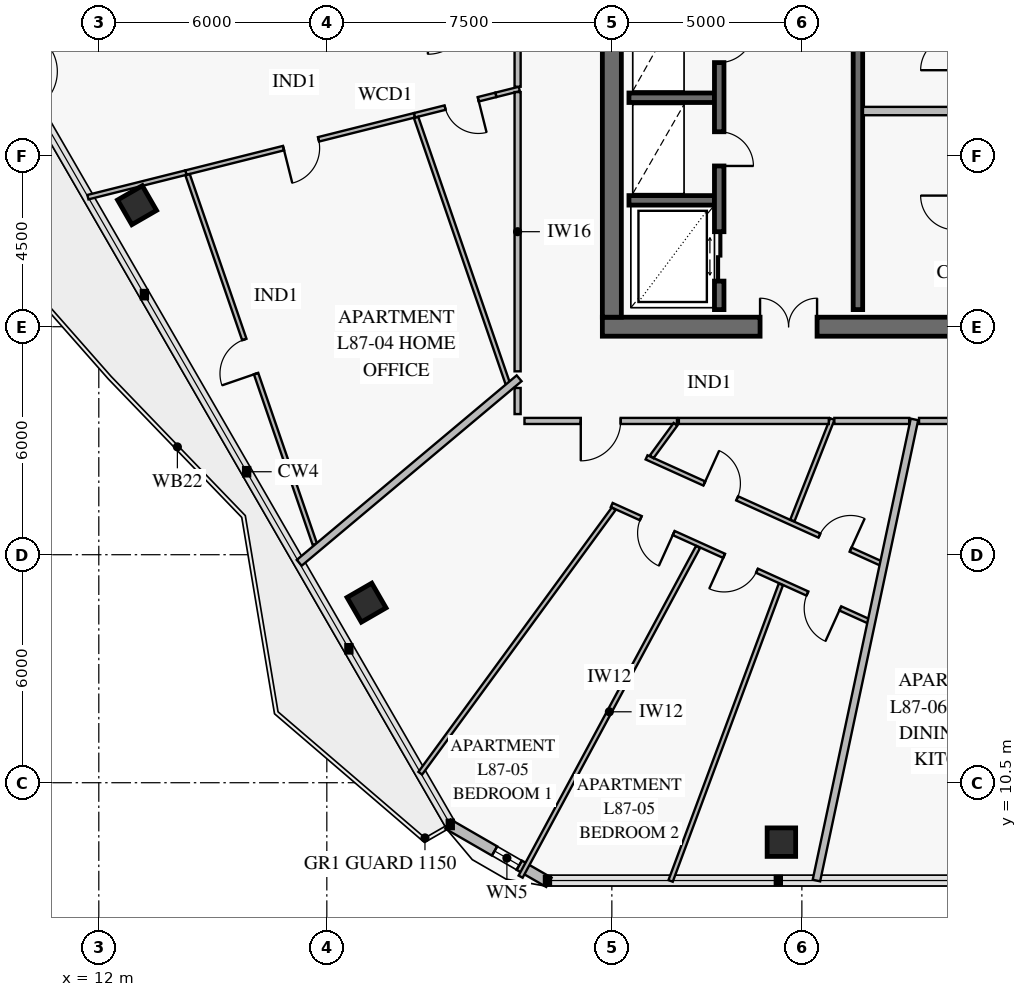
"""IFC4 building model, lengths in metres.
Left out: names, types, materials, properties, quantities, classifications, styles, units other than length and angle.
Written with IfcOpenShell. Run it as: python <this file> out.ifc"""

import sys

from ifc_helpers import new_model, si_unit, direction, frame, frame_2d, origin, origin_2d, place, context, subcontext, project, spatial, rectangle, extrude, element, fill, save


model = new_model("IFC4")
c1 = context("Model", 3, precision=1e-05, world=origin(), true_north=direction((0.0, 1.0)))
c2 = subcontext(c1, "Body", "Model", "MODEL_VIEW")
j1 = project(units=[si_unit("LENGTHUNIT", "METRE"), si_unit("PLANEANGLEUNIT", "RADIAN")], contexts=[c1])
p1 = place(None, origin())
s1 = spatial("IfcSite", under=j1, at=p1, CompositionType="ELEMENT")
p2 = place(p1, origin())
s2 = spatial("IfcBuilding", under=s1, at=p2, CompositionType="ELEMENT")
p3 = place(p2, frame((0.0, 0.0, 342.4)))
s3 = spatial("IfcBuildingStorey", under=s2, at=p3, CompositionType="ELEMENT", Elevation=342.4)
p4 = place(p3, frame((25.25, 22.5, 0.0), z_axis=(0.0, 0.0, 1.0), x_axis=(1.0, 0.0, 0.0)))
e1 = element("IfcWall", 1, at=p4, inside=s3, PredefinedType="SHEAR", context=c2, shape_type="SweptSolid", body=[
    extrude(rectangle(XDim=9.8, YDim=0.5, at=frame_2d((4.9, 0.0))), origin(), (0.0, 0.0, 1.0), 3.8),
])
p5 = place(p4, frame((4.15, 0.0, 0.0)))
e2 = element("IfcOpeningElement", 2, at=p5, cuts=e1, PredefinedType="OPENING", context=c2, shape_type="SweptSolid", body=[
    extrude(rectangle(XDim=1.5, YDim=2.15, at=frame_2d((0.75, 1.075))), frame((0.0, 0.262, 0.0), z_axis=(0.0, -1.0, 0.0), x_axis=(1.0, 0.0, 0.0)), (0.0, 0.0, 1.0), 0.524),
])
p6 = place(p3, frame((25.5, 22.75, 0.0), z_axis=(0.0, 0.0, 1.0), x_axis=(0.0, 1.0, 0.0)))
e3 = element("IfcWall", 3, at=p6, inside=s3, PredefinedType="SHEAR", context=c2, shape_type="SweptSolid", body=[
    extrude(rectangle(XDim=18.5, YDim=0.5, at=frame_2d((9.25, 0.0))), origin(), (0.0, 0.0, 1.0), 3.8),
])
p7 = place(p6, frame((9.0, 0.0, 0.0)))
e4 = element("IfcOpeningElement", 4, at=p7, cuts=e3, PredefinedType="OPENING", context=c2, shape_type="SweptSolid", body=[
    extrude(rectangle(XDim=1.1, YDim=2.15, at=frame_2d((0.55, 1.075))), frame((0.0, 0.262, 0.0), z_axis=(0.0, -1.0, 0.0), x_axis=(1.0, 0.0, 0.0)), (0.0, 0.0, 1.0), 0.524),
])
for number, where, z_axis, x_axis in (
    (5, (13.007, 25.698, 0.0), (0.0, 0.0, 1.0), (0.5, -0.866, 0.0)),
    (6, (19.045, 15.238, 0.0), (0.0, 0.0, 1.0), (0.5, -0.866, 0.0)),
    (7, (29.961, 8.936, 0.0), (0.0, 0.0, 1.0), (1.0, 0.0, 0.0)),
):
    element("IfcColumn", number, at=place(p3, frame(where, z_axis=z_axis, x_axis=x_axis)), inside=s3, PredefinedType="COLUMN", context=c2, shape_type="SweptSolid", body=[
        extrude(rectangle(XDim=0.75, YDim=0.75, at=origin_2d()), origin(), (0.0, 0.0, 1.0), 3.55),
    ])
p8 = place(p3, frame((23.843, 7.878, 0.0), z_axis=(0.0, 0.0, 1.0), x_axis=(-0.866023752521, 0.50000286006, 0.0)))
e8 = element("IfcWall", 8, at=p8, inside=s3, PredefinedType="SOLIDWALL", context=c2, shape_type="SweptSolid", body=[
    extrude(rectangle(XDim=3.065, YDim=0.28, at=frame_2d((1.532, 0.0))), origin(), (0.0, 0.0, 1.0), 3.55),
])
p9 = place(p8, frame((0.901, 0.0, 0.85)))
e9 = element("IfcOpeningElement", 9, at=p9, cuts=e8, PredefinedType="OPENING", context=c2, shape_type="SweptSolid", body=[
    extrude(rectangle(XDim=0.75, YDim=1.5, at=frame_2d((0.375, 0.75))), frame((0.0, 0.152, 0.0), z_axis=(0.0, -1.0, 0.0), x_axis=(1.0, 0.0, 0.0)), (0.0, 0.0, 1.0), 0.304),
])
for number, where, z_axis, x_axis in (
    (10, (25.95, 25.825, 0.0), (0.0, 0.0, 1.0), (1.0, 0.0, 0.0)),
    (11, (25.95, 28.525, 0.0), (0.0, 0.0, 1.0), (1.0, 0.0, 0.0)),
):
    element("IfcWall", number, at=place(p3, frame(where, z_axis=z_axis, x_axis=x_axis)), inside=s3, PredefinedType="SOLIDWALL", context=c2, shape_type="SweptSolid", body=[
        extrude(rectangle(XDim=2.25, YDim=0.25, at=frame_2d((1.125, 0.0))), origin(), (0.0, 0.0, 1.0), 3.8),
    ])
p10 = place(p3, frame((28.325, 22.95, 0.0), z_axis=(0.0, 0.0, 1.0), x_axis=(0.0, 1.0, 0.0)))
e12 = element("IfcWall", 12, at=p10, inside=s3, PredefinedType="SOLIDWALL", context=c2, shape_type="SweptSolid", body=[
    extrude(rectangle(XDim=8.2, YDim=0.25, at=frame_2d((4.1, 0.0))), origin(), (0.0, 0.0, 1.0), 3.8),
])
p11 = place(p10, frame((0.75, 0.0, 0.0)))
e13 = element("IfcOpeningElement", 13, at=p11, cuts=e12, PredefinedType="OPENING", context=c2, shape_type="SweptSolid", body=[
    extrude(rectangle(XDim=1.3, YDim=2.3, at=frame_2d((0.65, 1.15))), frame((0.0, 0.137, 0.0), z_axis=(0.0, -1.0, 0.0), x_axis=(1.0, 0.0, 0.0)), (0.0, 0.0, 1.0), 0.274),
])
p12 = place(p10, frame((3.78, 0.0, 0.0)))
e14 = element("IfcOpeningElement", 14, at=p12, cuts=e12, PredefinedType="OPENING", context=c2, shape_type="SweptSolid", body=[
    extrude(rectangle(XDim=0.9, YDim=2.1, at=frame_2d((0.45, 1.05))), frame((0.0, 0.137, 0.0), z_axis=(0.0, -1.0, 0.0), x_axis=(1.0, 0.0, 0.0)), (0.0, 0.0, 1.0), 0.274),
])
p13 = place(p10, frame((6.5, 0.0, 0.0)))
e15 = element("IfcOpeningElement", 15, at=p13, cuts=e12, PredefinedType="OPENING", context=c2, shape_type="SweptSolid", body=[
    extrude(rectangle(XDim=0.9, YDim=2.1, at=frame_2d((0.45, 1.05))), frame((0.0, 0.137, 0.0), z_axis=(0.0, -1.0, 0.0), x_axis=(1.0, 0.0, 0.0)), (0.0, 0.0, 1.0), 0.274),
])
p14 = place(p3, frame((31.975, 22.95, 0.0), z_axis=(0.0, 0.0, 1.0), x_axis=(0.0, 1.0, 0.0)))
e16 = element("IfcWall", 16, at=p14, inside=s3, PredefinedType="SOLIDWALL", context=c2, shape_type="SweptSolid", body=[
    extrude(rectangle(XDim=8.2, YDim=0.25, at=frame_2d((4.1, 0.0))), origin(), (0.0, 0.0, 1.0), 3.8),
])
p15 = place(p3, frame((22.45, 28.602, 0.0), z_axis=(0.0, 0.0, 1.0), x_axis=(-0.969941016034, -0.243340143452, 0.0)))
e17 = element("IfcWall", 17, at=p15, inside=s3, PredefinedType="PARTITIONING", context=c2, shape_type="SweptSolid", body=[
    extrude(rectangle(XDim=2.213, YDim=0.12, at=frame_2d((1.106, 0.0))), origin(), (0.0, 0.0, 1.0), 3.55),
])
p16 = place(p15, frame((0.479, 0.0, 0.0)))
e18 = element("IfcOpeningElement", 18, at=p16, cuts=e17, PredefinedType="OPENING", context=c2, shape_type="SweptSolid", body=[
    extrude(rectangle(XDim=0.9, YDim=2.1, at=frame_2d((0.45, 1.05))), frame((0.0, 0.072, 0.0), z_axis=(0.0, -1.0, 0.0), x_axis=(1.0, 0.0, 0.0)), (0.0, 0.0, 1.0), 0.144),
])
p17 = place(p3, frame((20.303, 28.063, 0.0), z_axis=(0.0, 0.0, 1.0), x_axis=(-0.969954547898, -0.243286199796, 0.0)))
e19 = element("IfcWall", 19, at=p17, inside=s3, PredefinedType="PARTITIONING", context=c2, shape_type="SweptSolid", body=[
    extrude(rectangle(XDim=6.199, YDim=0.12, at=frame_2d((3.099, 0.0))), origin(), (0.0, 0.0, 1.0), 3.55),
])
p18 = place(p17, frame((2.599, 0.0, 0.0)))
e20 = element("IfcOpeningElement", 20, at=p18, cuts=e19, PredefinedType="OPENING", context=c2, shape_type="SweptSolid", body=[
    extrude(rectangle(XDim=0.95, YDim=2.1, at=frame_2d((0.475, 1.05))), frame((0.0, 0.072, 0.0), z_axis=(0.0, -1.0, 0.0), x_axis=(1.0, 0.0, 0.0)), (0.0, 0.0, 1.0), 0.144),
])
p19 = place(p3, frame((14.337, 26.497, 0.0), z_axis=(0.0, 0.0, 1.0), x_axis=(0.325570697436, -0.945517699978, 0.0)))
e21 = element("IfcWall", 21, at=p19, inside=s3, PredefinedType="PARTITIONING", context=c2, shape_type="SweptSolid", body=[
    extrude(rectangle(XDim=10.284, YDim=0.12, at=frame_2d((5.142, 0.0))), origin(), (0.0, 0.0, 1.0), 2.97),
])
p20 = place(p19, frame((4.583, 0.0, 0.0)))
e22 = element("IfcOpeningElement", 22, at=p20, cuts=e21, PredefinedType="OPENING", context=c2, shape_type="SweptSolid", body=[
    extrude(rectangle(XDim=0.95, YDim=2.1, at=frame_2d((0.475, 1.05))), frame((0.0, 0.072, 0.0), z_axis=(0.0, -1.0, 0.0), x_axis=(1.0, 0.0, 0.0)), (0.0, 0.0, 1.0), 0.144),
])
p21 = place(p3, frame((26.413, 19.061, 0.0), z_axis=(0.0, 0.0, 1.0), x_axis=(0.911113377023, -0.412155813024, 0.0)))
e23 = element("IfcWall", 23, at=p21, inside=s3, PredefinedType="PARTITIONING", context=c2, shape_type="SweptSolid", body=[
    extrude(rectangle(XDim=6.804, YDim=0.12, at=frame_2d((3.402, 0.0))), origin(), (0.0, 0.0, 1.0), 3.0),
])
p22 = place(p21, frame((1.667, 0.0, 0.0)))
e24 = element("IfcOpeningElement", 24, at=p22, cuts=e23, PredefinedType="OPENING", context=c2, shape_type="SweptSolid", body=[
    extrude(rectangle(XDim=0.95, YDim=2.1, at=frame_2d((0.475, 1.05))), frame((0.0, 0.072, 0.0), z_axis=(0.0, -1.0, 0.0), x_axis=(1.0, 0.0, 0.0)), (0.0, 0.0, 1.0), 0.144),
])
p23 = place(p21, frame((4.992, 0.0, 0.0)))
e25 = element("IfcOpeningElement", 25, at=p23, cuts=e23, PredefinedType="OPENING", context=c2, shape_type="SweptSolid", body=[
    extrude(rectangle(XDim=0.9, YDim=2.1, at=frame_2d((0.45, 1.05))), frame((0.0, 0.072, 0.0), z_axis=(0.0, -1.0, 0.0), x_axis=(1.0, 0.0, 0.0)), (0.0, 0.0, 1.0), 0.144),
])
p24 = place(p3, frame((25.497, 17.808, 0.0), z_axis=(0.0, 0.0, 1.0), x_axis=(0.911109976368, -0.412163330445, 0.0)))
e26 = element("IfcWall", 26, at=p24, inside=s3, PredefinedType="PARTITIONING", context=c2, shape_type="SweptSolid", body=[
    extrude(rectangle(XDim=7.441, YDim=0.12, at=frame_2d((3.72, 0.0))), origin(), (0.0, 0.0, 1.0), 3.0),
])
p25 = place(p24, frame((0.84, 0.0, 0.0)))
e27 = element("IfcOpeningElement", 27, at=p25, cuts=e26, PredefinedType="OPENING", context=c2, shape_type="SweptSolid", body=[
    extrude(rectangle(XDim=0.95, YDim=2.1, at=frame_2d((0.475, 1.05))), frame((0.0, 0.072, 0.0), z_axis=(0.0, -1.0, 0.0), x_axis=(1.0, 0.0, 0.0)), (0.0, 0.0, 1.0), 0.144),
])
p26 = place(p24, frame((3.246, 0.0, 0.0)))
e28 = element("IfcOpeningElement", 28, at=p26, cuts=e26, PredefinedType="OPENING", context=c2, shape_type="SweptSolid", body=[
    extrude(rectangle(XDim=0.95, YDim=2.1, at=frame_2d((0.475, 1.05))), frame((0.0, 0.072, 0.0), z_axis=(0.0, -1.0, 0.0), x_axis=(1.0, 0.0, 0.0)), (0.0, 0.0, 1.0), 0.144),
])
p27 = place(p24, frame((5.651, 0.0, 0.0)))
e29 = element("IfcOpeningElement", 29, at=p27, cuts=e26, PredefinedType="OPENING", context=c2, shape_type="SweptSolid", body=[
    extrude(rectangle(XDim=0.95, YDim=2.1, at=frame_2d((0.475, 1.05))), frame((0.0, 0.072, 0.0), z_axis=(0.0, -1.0, 0.0), x_axis=(1.0, 0.0, 0.0)), (0.0, 0.0, 1.0), 0.144),
])
p28 = place(p3, frame((23.201, 20.02, 0.0), z_axis=(0.0, 0.0, 1.0), x_axis=(1.0, 0.0, 0.0)))
e30 = element("IfcWall", 30, at=p28, inside=s3, PredefinedType="PARTITIONING", context=c2, shape_type="SweptSolid", body=[
    extrude(rectangle(XDim=4.013, YDim=0.16, at=frame_2d((2.006, 0.0))), origin(), (0.0, 0.0, 1.0), 3.0),
])
p29 = place(p28, frame((1.481, 0.0, 0.0)))
e31 = element("IfcOpeningElement", 31, at=p29, cuts=e30, PredefinedType="OPENING", context=c2, shape_type="SweptSolid", body=[
    extrude(rectangle(XDim=1.05, YDim=2.15, at=frame_2d((0.525, 1.075))), frame((0.0, 0.092, 0.0), z_axis=(0.0, -1.0, 0.0), x_axis=(1.0, 0.0, 0.0)), (0.0, 0.0, 1.0), 0.184),
])
p30 = place(p3, frame((32.108, 28.175, 0.0), z_axis=(0.0, 0.0, 1.0), x_axis=(1.0, 0.0, 0.0)))
e32 = element("IfcWall", 32, at=p30, inside=s3, PredefinedType="PARTITIONING", context=c2, shape_type="SweptSolid", body=[
    extrude(rectangle(XDim=2.284, YDim=0.22, at=frame_2d((1.142, 0.0))), origin(), (0.0, 0.0, 1.0), 3.55),
])
p31 = place(p3, frame((23.064, 28.756, 0.0), z_axis=(0.0, 0.0, 1.0), x_axis=(-0.969960808965, -0.243261236271, 0.0)))
e33 = element("IfcWall", 33, at=p31, inside=s3, PredefinedType="PARTITIONING", context=c2, shape_type="SweptSolid", body=[
    extrude(rectangle(XDim=0.633, YDim=0.12, at=frame_2d((0.317, 0.0))), origin(), (0.0, 0.0, 1.0), 3.55),
])
p32 = place(p3, frame((14.291, 26.555, 0.0), z_axis=(0.0, 0.0, 1.0), x_axis=(-0.969963851094, -0.243249106002, 0.0)))
e34 = element("IfcWall", 34, at=p32, inside=s3, PredefinedType="PARTITIONING", context=c2, shape_type="SweptSolid", body=[
    extrude(rectangle(XDim=2.657, YDim=0.12, at=frame_2d((1.328, 0.0))), origin(), (0.0, 0.0, 1.0), 2.97),
])
p33 = place(p3, frame((20.35, 28.005, 0.0), z_axis=(0.0, 0.0, 1.0), x_axis=(0.32554082169, -0.945527986584, 0.0)))
e35 = element("IfcWall", 35, at=p33, inside=s3, PredefinedType="PARTITIONING", context=c2, shape_type="SweptSolid", body=[
    extrude(rectangle(XDim=7.443, YDim=0.12, at=frame_2d((3.722, 0.0))), origin(), (0.0, 0.0, 1.0), 3.0),
])
p34 = place(p3, frame((23.06, 21.142, 0.0), z_axis=(0.0, 0.0, 1.0), x_axis=(-0.766052406388, -0.642778119313, 0.0)))
e36 = element("IfcWall", 36, at=p34, inside=s3, PredefinedType="PARTITIONING", context=c2, shape_type="SweptSolid", body=[
    extrude(rectangle(XDim=7.553, YDim=0.2, at=frame_2d((3.777, 0.0))), origin(), (0.0, 0.0, 1.0), 2.97),
])
p35 = place(p3, frame((31.301, 20.07, 0.0), z_axis=(0.0, 0.0, 1.0), x_axis=(-0.366426296645, -0.93044708024, 0.0)))
e37 = element("IfcWall", 37, at=p35, inside=s3, PredefinedType="PARTITIONING", context=c2, shape_type="SweptSolid", body=[
    extrude(rectangle(XDim=2.869, YDim=0.12, at=frame_2d((1.435, 0.0))), origin(), (0.0, 0.0, 1.0), 3.55),
])
p36 = place(p3, frame((27.769, 16.705, 0.0), z_axis=(0.0, 0.0, 1.0), x_axis=(-0.473888532378, -0.880584839116, 0.0)))
e38 = element("IfcWall", 38, at=p36, inside=s3, PredefinedType="PARTITIONING", context=c2, shape_type="SweptSolid", body=[
    extrude(rectangle(XDim=9.854, YDim=0.12, at=frame_2d((4.927, 0.0))), origin(), (0.0, 0.0, 1.0), 2.97),
])
p37 = place(p3, frame((29.948, 15.72, 0.0), z_axis=(0.0, 0.0, 1.0), x_axis=(-0.34846114111, -0.937323227673, 0.0)))
e39 = element("IfcWall", 39, at=p37, inside=s3, PredefinedType="PARTITIONING", context=c2, shape_type="SweptSolid", body=[
    extrude(rectangle(XDim=8.325, YDim=0.12, at=frame_2d((4.163, 0.0))), origin(), (0.0, 0.0, 1.0), 2.97),
])
p38 = place(p3, frame((27.174, 19.932, 0.0), z_axis=(0.0, 0.0, 1.0), x_axis=(-0.590276099666, -0.807201416106, 0.0)))
e40 = element("IfcWall", 40, at=p38, inside=s3, PredefinedType="PARTITIONING", context=c2, shape_type="SweptSolid", body=[
    extrude(rectangle(XDim=1.061, YDim=0.12, at=frame_2d((0.531, 0.0))), origin(), (0.0, 0.0, 1.0), 3.55),
])
p39 = place(p3, frame((25.549, 17.71, 0.0), z_axis=(0.0, 0.0, 1.0), x_axis=(-0.59031116807, -0.807175770729, 0.0)))
e41 = element("IfcWall", 41, at=p39, inside=s3, PredefinedType="PARTITIONING", context=c2, shape_type="SweptSolid", body=[
    extrude(rectangle(XDim=8.622, YDim=0.12, at=frame_2d((4.311, 0.0))), origin(), (0.0, 0.0, 1.0), 2.97),
])
p40 = place(p3, frame((33.462, 20.06, 0.0), z_axis=(0.0, 0.0, 1.0), x_axis=(-0.207921364867, -0.978145544401, 0.0)))
e42 = element("IfcWall", 42, at=p40, inside=s3, PredefinedType="PARTITIONING", context=c2, shape_type="SweptSolid", body=[
    extrude(rectangle(XDim=12.405, YDim=0.2, at=frame_2d((6.203, 0.0))), origin(), (0.0, 0.0, 1.0), 2.97),
])
p41 = place(p3, frame((23.02, 30.632, 0.0), z_axis=(0.0, 0.0, 1.0), x_axis=(0.0, -1.0, 0.0)))
e43 = element("IfcWall", 43, at=p41, inside=s3, PredefinedType="PARTITIONING", context=c2, shape_type="SweptSolid", body=[
    extrude(rectangle(XDim=1.817, YDim=0.16, at=frame_2d((0.909, 0.0))), origin(), (0.0, 0.0, 1.0), 3.55),
])
p42 = place(p3, frame((23.02, 28.674, 0.0), z_axis=(0.0, 0.0, 1.0), x_axis=(0.0, -1.0, 0.0)))
e44 = element("IfcWall", 44, at=p42, inside=s3, PredefinedType="PARTITIONING", context=c2, shape_type="SweptSolid", body=[
    extrude(rectangle(XDim=7.348, YDim=0.16, at=frame_2d((3.674, 0.0))), origin(), (0.0, 0.0, 1.0), 3.0),
])
p43 = place(p3, frame((23.02, 20.888, 0.0), z_axis=(0.0, 0.0, 1.0), x_axis=(0.0, -1.0, 0.0)))
e45 = element("IfcWall", 45, at=p43, inside=s3, PredefinedType="PARTITIONING", context=c2, shape_type="SweptSolid", body=[
    extrude(rectangle(XDim=0.687, YDim=0.16, at=frame_2d((0.344, 0.0))), origin(), (0.0, 0.0, 1.0), 3.55),
])
p44 = place(p3, frame((27.263, 20.02, 0.0), z_axis=(0.0, 0.0, 1.0), x_axis=(1.0, 0.0, 0.0)))
e46 = element("IfcWall", 46, at=p44, inside=s3, PredefinedType="PARTITIONING", context=c2, shape_type="SweptSolid", body=[
    extrude(rectangle(XDim=3.945, YDim=0.16, at=frame_2d((1.973, 0.0))), origin(), (0.0, 0.0, 1.0), 3.55),
])
p45 = place(p3, frame((31.354, 20.02, 0.0), z_axis=(0.0, 0.0, 1.0), x_axis=(1.0, 0.0, 0.0)))
e47 = element("IfcWall", 47, at=p45, inside=s3, PredefinedType="PARTITIONING", context=c2, shape_type="SweptSolid", body=[
    extrude(rectangle(XDim=1.969, YDim=0.16, at=frame_2d((0.984, 0.0))), origin(), (0.0, 0.0, 1.0), 3.0),
])
p46 = place(p3, frame((33.583, 20.02, 0.0), z_axis=(0.0, 0.0, 1.0), x_axis=(1.0, 0.0, 0.0)))
e48 = element("IfcWall", 48, at=p46, inside=s3, PredefinedType="PARTITIONING", context=c2, shape_type="SweptSolid", body=[
    extrude(rectangle(XDim=1.049, YDim=0.16, at=frame_2d((0.524, 0.0))), origin(), (0.0, 0.0, 1.0), 3.55),
])
p47 = place(p9, origin())
e49 = element("IfcWindow", 49, at=p47, inside=s3, PartitioningType="SINGLE_PANEL", PredefinedType="WINDOW", context=c2, shape_type="SweptSolid", body=[
    extrude(rectangle(XDim=0.75, YDim=1.5, at=frame_2d((0.375, 0.75))), frame((0.0, 0.03, 0.0), z_axis=(0.0, -1.0, 0.0), x_axis=(1.0, 0.0, 0.0)), (0.0, 0.0, 1.0), 0.06),
])
fill(e9, e49)
p48 = place(p5, origin())
e50 = element("IfcDoor", 50, at=p48, inside=s3, OperationType="DOUBLE_DOOR_SINGLE_SWING", PredefinedType="DOOR", context=c2, shape_type="SweptSolid", body=[
    extrude(rectangle(XDim=1.5, YDim=2.15, at=frame_2d((0.75, 1.075))), frame((0.0, 0.025, 0.0), z_axis=(0.0, -1.0, 0.0), x_axis=(1.0, 0.0, 0.0)), (0.0, 0.0, 1.0), 0.05),
])
fill(e2, e50)
p49 = place(p11, frame((1.3, 0.0, 0.0), z_axis=(0.0, 0.0, 1.0), x_axis=(-1.0, 0.0, 0.0)))
e51 = element("IfcDoor", 51, at=p49, inside=s3, OperationType="DOUBLE_DOOR_SLIDING", PredefinedType="DOOR", context=c2, shape_type="SweptSolid", body=[
    extrude(rectangle(XDim=1.3, YDim=2.3, at=frame_2d((0.65, 1.15))), frame((0.0, 0.025, 0.0), z_axis=(0.0, -1.0, 0.0), x_axis=(1.0, 0.0, 0.0)), (0.0, 0.0, 1.0), 0.05),
])
fill(e13, e51)
p50 = place(p12, frame((0.9, 0.0, 0.0), z_axis=(0.0, 0.0, 1.0), x_axis=(-1.0, 0.0, 0.0)))
e52 = element("IfcDoor", 52, at=p50, inside=s3, OperationType="SINGLE_SWING_RIGHT", PredefinedType="DOOR", context=c2, shape_type="SweptSolid", body=[
    extrude(rectangle(XDim=0.9, YDim=2.1, at=frame_2d((0.45, 1.05))), frame((0.0, 0.025, 0.0), z_axis=(0.0, -1.0, 0.0), x_axis=(1.0, 0.0, 0.0)), (0.0, 0.0, 1.0), 0.05),
])
fill(e14, e52)
p51 = place(p13, frame((0.9, 0.0, 0.0), z_axis=(0.0, 0.0, 1.0), x_axis=(-1.0, 0.0, 0.0)))
e53 = element("IfcDoor", 53, at=p51, inside=s3, OperationType="SINGLE_SWING_LEFT", PredefinedType="DOOR", context=c2, shape_type="SweptSolid", body=[
    extrude(rectangle(XDim=0.9, YDim=2.1, at=frame_2d((0.45, 1.05))), frame((0.0, 0.025, 0.0), z_axis=(0.0, -1.0, 0.0), x_axis=(1.0, 0.0, 0.0)), (0.0, 0.0, 1.0), 0.05),
])
fill(e15, e53)
p52 = place(p16, origin())
e54 = element("IfcDoor", 54, at=p52, inside=s3, OperationType="SINGLE_SWING_LEFT", PredefinedType="DOOR", context=c2, shape_type="SweptSolid", body=[
    extrude(rectangle(XDim=0.9, YDim=2.1, at=frame_2d((0.45, 1.05))), frame((0.0, 0.025, 0.0), z_axis=(0.0, -1.0, 0.0), x_axis=(1.0, 0.0, 0.0)), (0.0, 0.0, 1.0), 0.05),
])
fill(e18, e54)
p53 = place(p18, origin())
e55 = element("IfcDoor", 55, at=p53, inside=s3, OperationType="SINGLE_SWING_RIGHT", PredefinedType="DOOR", context=c2, shape_type="SweptSolid", body=[
    extrude(rectangle(XDim=0.95, YDim=2.1, at=frame_2d((0.475, 1.05))), frame((0.0, 0.025, 0.0), z_axis=(0.0, -1.0, 0.0), x_axis=(1.0, 0.0, 0.0)), (0.0, 0.0, 1.0), 0.05),
])
fill(e20, e55)
p54 = place(p20, frame((0.95, 0.0, 0.0), z_axis=(0.0, 0.0, 1.0), x_axis=(-1.0, 0.0, 0.0)))
e56 = element("IfcDoor", 56, at=p54, inside=s3, OperationType="SINGLE_SWING_LEFT", PredefinedType="DOOR", context=c2, shape_type="SweptSolid", body=[
    extrude(rectangle(XDim=0.95, YDim=2.1, at=frame_2d((0.475, 1.05))), frame((0.0, 0.025, 0.0), z_axis=(0.0, -1.0, 0.0), x_axis=(1.0, 0.0, 0.0)), (0.0, 0.0, 1.0), 0.05),
])
fill(e22, e56)
p55 = place(p22, origin())
e57 = element("IfcDoor", 57, at=p55, inside=s3, OperationType="SINGLE_SWING_LEFT", PredefinedType="DOOR", context=c2, shape_type="SweptSolid", body=[
    extrude(rectangle(XDim=0.95, YDim=2.1, at=frame_2d((0.475, 1.05))), frame((0.0, 0.025, 0.0), z_axis=(0.0, -1.0, 0.0), x_axis=(1.0, 0.0, 0.0)), (0.0, 0.0, 1.0), 0.05),
])
fill(e24, e57)
p56 = place(p23, origin())
e58 = element("IfcDoor", 58, at=p56, inside=s3, OperationType="SINGLE_SWING_RIGHT", PredefinedType="DOOR", context=c2, shape_type="SweptSolid", body=[
    extrude(rectangle(XDim=0.9, YDim=2.1, at=frame_2d((0.45, 1.05))), frame((0.0, 0.025, 0.0), z_axis=(0.0, -1.0, 0.0), x_axis=(1.0, 0.0, 0.0)), (0.0, 0.0, 1.0), 0.05),
])
fill(e25, e58)
p57 = place(p25, frame((0.95, 0.0, 0.0), z_axis=(0.0, 0.0, 1.0), x_axis=(-1.0, 0.0, 0.0)))
e59 = element("IfcDoor", 59, at=p57, inside=s3, OperationType="SINGLE_SWING_LEFT", PredefinedType="DOOR", context=c2, shape_type="SweptSolid", body=[
    extrude(rectangle(XDim=0.95, YDim=2.1, at=frame_2d((0.475, 1.05))), frame((0.0, 0.025, 0.0), z_axis=(0.0, -1.0, 0.0), x_axis=(1.0, 0.0, 0.0)), (0.0, 0.0, 1.0), 0.05),
])
fill(e27, e59)
p58 = place(p26, frame((0.95, 0.0, 0.0), z_axis=(0.0, 0.0, 1.0), x_axis=(-1.0, 0.0, 0.0)))
e60 = element("IfcDoor", 60, at=p58, inside=s3, OperationType="SINGLE_SWING_RIGHT", PredefinedType="DOOR", context=c2, shape_type="SweptSolid", body=[
    extrude(rectangle(XDim=0.95, YDim=2.1, at=frame_2d((0.475, 1.05))), frame((0.0, 0.025, 0.0), z_axis=(0.0, -1.0, 0.0), x_axis=(1.0, 0.0, 0.0)), (0.0, 0.0, 1.0), 0.05),
])
fill(e28, e60)
p59 = place(p27, frame((0.95, 0.0, 0.0), z_axis=(0.0, 0.0, 1.0), x_axis=(-1.0, 0.0, 0.0)))
e61 = element("IfcDoor", 61, at=p59, inside=s3, OperationType="SINGLE_SWING_LEFT", PredefinedType="DOOR", context=c2, shape_type="SweptSolid", body=[
    extrude(rectangle(XDim=0.95, YDim=2.1, at=frame_2d((0.475, 1.05))), frame((0.0, 0.025, 0.0), z_axis=(0.0, -1.0, 0.0), x_axis=(1.0, 0.0, 0.0)), (0.0, 0.0, 1.0), 0.05),
])
fill(e29, e61)
p60 = place(p29, frame((1.05, 0.0, 0.0), z_axis=(0.0, 0.0, 1.0), x_axis=(-1.0, 0.0, 0.0)))
e62 = element("IfcDoor", 62, at=p60, inside=s3, OperationType="SINGLE_SWING_RIGHT", PredefinedType="DOOR", context=c2, shape_type="SweptSolid", body=[
    extrude(rectangle(XDim=1.05, YDim=2.15, at=frame_2d((0.525, 1.075))), frame((0.0, 0.025, 0.0), z_axis=(0.0, -1.0, 0.0), x_axis=(1.0, 0.0, 0.0)), (0.0, 0.0, 1.0), 0.05),
])
fill(e31, e62)
save(model, sys.argv[1])
